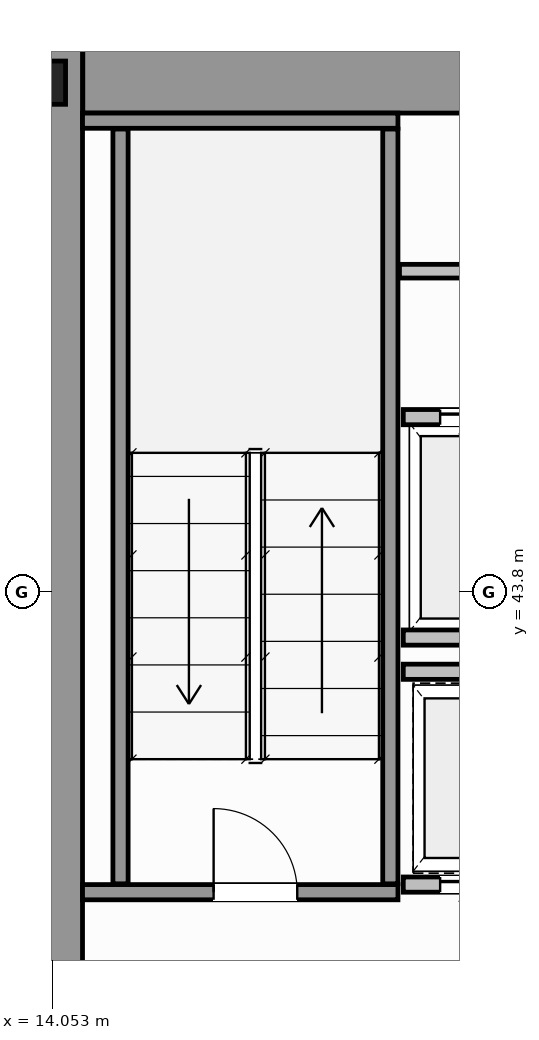
"""IFC4 building model, lengths in metres.
Left out: names, types, materials, properties, quantities, classifications, styles, units other than length and angle.
Written with IfcOpenShell. Run it as: python <this file> out.ifc"""

import sys

from ifc_helpers import new_model, si_unit, direction, frame, frame_2d, origin, origin_2d, place, context, subcontext, project, spatial, rectangle, i_section, extrude, source, transform, mapped, element, fill, save


model = new_model("IFC4")
c1 = context("Model", 3, precision=1e-05, world=origin(), true_north=direction((0.0, 1.0)))
c2 = subcontext(c1, "Body", "Model", "MODEL_VIEW")
j1 = project(units=[si_unit("LENGTHUNIT", "METRE"), si_unit("PLANEANGLEUNIT", "RADIAN")], contexts=[c1])
p1 = place(None, origin())
s1 = spatial("IfcSite", under=j1, at=p1, CompositionType="ELEMENT")
p2 = place(p1, origin())
s2 = spatial("IfcBuilding", under=s1, at=p2, CompositionType="ELEMENT")
p3 = place(p2, frame((0.0, 0.0, 5.6)))
s3 = spatial("IfcBuildingStorey", under=s2, at=p3, CompositionType="ELEMENT", Elevation=5.6)
m1 = source(origin(), c2, "Body", "SweptSolid", [
    extrude(i_section(OverallWidth=0.454, OverallDepth=0.569, WebThickness=0.078, FlangeThickness=0.08, FilletRadius=0.015, at=origin_2d()), origin(), (0.0, 0.0, 1.0), 4.4),
])
p4 = place(p3, frame((14.0, 50.5, 0.0), z_axis=(0.0, 0.0, 1.0), x_axis=(1.0, 0.0, 0.0)))
e1 = element("IfcColumn", 1, at=p4, inside=s3, PredefinedType="COLUMN", context=c2, shape_type="MappedRepresentation", body=[
    mapped(m1, transform((0.0, 0.0, 0.0), scale=1.0)),
])
p5 = place(p3, frame((14.454, 50.55, 0.0), z_axis=(0.0, 0.0, 1.0), x_axis=(1.0, 0.0, 0.0)))
e2 = element("IfcWall", 2, at=p5, inside=s3, PredefinedType="SHEAR", context=c2, shape_type="SweptSolid", body=[
    extrude(rectangle(XDim=19.544, YDim=0.9, at=frame_2d((9.772, 0.0))), origin(), (0.0, 0.0, 1.0), 4.4),
])
p6 = place(p3, frame((14.0, 36.5, 0.0), z_axis=(0.0, 0.0, 1.0), x_axis=(0.0, 1.0, 0.0)))
e3 = element("IfcWall", 3, at=p6, inside=s3, PredefinedType="SHEAR", context=c2, shape_type="SweptSolid", body=[
    extrude(rectangle(XDim=14.5, YDim=0.9, at=frame_2d((7.25, 0.0))), origin(), (0.0, 0.0, 1.0), 4.4),
])
p7 = place(p3, frame((14.45, 39.85, 0.0), z_axis=(0.0, 0.0, 1.0), x_axis=(1.0, 0.0, 0.0)))
e4 = element("IfcWall", 4, at=p7, inside=s3, PredefinedType="SOLIDWALL", context=c2, shape_type="SweptSolid", body=[
    extrude(rectangle(XDim=4.15, YDim=0.2, at=frame_2d((2.075, 0.0))), origin(), (0.0, 0.0, 1.0), 4.4),
])
p8 = place(p7, frame((1.725, 0.0, 0.0)))
e5 = element("IfcOpeningElement", 5, at=p8, cuts=e4, PredefinedType="OPENING", context=c2, shape_type="SweptSolid", body=[
    extrude(rectangle(XDim=1.1, YDim=2.15, at=frame_2d((0.55, 1.075))), frame((0.0, 0.11, 0.0), z_axis=(0.0, -1.0, 0.0), x_axis=(1.0, 0.0, 0.0)), (0.0, 0.0, 1.0), 0.22),
])
p9 = place(p3, frame((14.45, 50.0, 0.0), z_axis=(0.0, 0.0, 1.0), x_axis=(1.0, 0.0, 0.0)))
e6 = element("IfcWall", 6, at=p9, inside=s3, PredefinedType="SOLIDWALL", context=c2, shape_type="SweptSolid", body=[
    extrude(rectangle(XDim=4.15, YDim=0.2, at=frame_2d((2.075, 0.0))), origin(), (0.0, 0.0, 1.0), 4.4),
])
for number, where, z_axis, x_axis in (
    (7, (14.95, 39.96, 0.0), (0.0, 0.0, 1.0), (0.0, 1.0, 0.0)),
    (8, (18.5, 39.96, 0.0), (0.0, 0.0, 1.0), (0.0, 1.0, 0.0)),
):
    element("IfcWall", number, at=place(p3, frame(where, z_axis=z_axis, x_axis=x_axis)), inside=s3, PredefinedType="SOLIDWALL", context=c2, shape_type="SweptSolid", body=[
        extrude(rectangle(XDim=9.93, YDim=0.2, at=frame_2d((4.965, 0.0))), origin(), (0.0, 0.0, 1.0), 4.4),
    ])
p10 = place(p3, frame((18.67, 46.1, 0.0), z_axis=(0.0, 0.0, 1.0), x_axis=(1.0, 0.0, 0.0)))
e9 = element("IfcWall", 9, at=p10, inside=s3, PredefinedType="SOLIDWALL", context=c2, shape_type="SweptSolid", body=[
    extrude(rectangle(XDim=2.07, YDim=0.2, at=frame_2d((1.035, 0.0))), origin(), (0.0, 0.0, 1.0), 4.12),
])
p11 = place(p10, frame((0.485, 0.0, 0.0)))
e10 = element("IfcOpeningElement", 10, at=p11, cuts=e9, PredefinedType="OPENING", context=c2, shape_type="SweptSolid", body=[
    extrude(rectangle(XDim=1.1, YDim=2.15, at=frame_2d((0.55, 1.075))), frame((0.0, 0.11, 0.0), z_axis=(0.0, -1.0, 0.0), x_axis=(1.0, 0.0, 0.0)), (0.0, 0.0, 1.0), 0.22),
])
p12 = place(p3, frame((18.67, 43.2, 0.0), z_axis=(0.0, 0.0, 1.0), x_axis=(1.0, 0.0, 0.0)))
e11 = element("IfcWall", 11, at=p12, inside=s3, PredefinedType="SOLIDWALL", context=c2, shape_type="SweptSolid", body=[
    extrude(rectangle(XDim=2.07, YDim=0.2, at=frame_2d((1.035, 0.0))), origin(), (0.0, 0.0, 1.0), 4.12),
])
p13 = place(p3, frame((18.67, 39.95, 0.0), z_axis=(0.0, 0.0, 1.0), x_axis=(1.0, 0.0, 0.0)))
e12 = element("IfcWall", 12, at=p13, inside=s3, PredefinedType="SOLIDWALL", context=c2, shape_type="SweptSolid", body=[
    extrude(rectangle(XDim=2.07, YDim=0.2, at=frame_2d((1.035, 0.0))), origin(), (0.0, 0.0, 1.0), 4.12),
])
p14 = place(p13, frame((0.485, 0.0, 0.0)))
e13 = element("IfcOpeningElement", 13, at=p14, cuts=e12, PredefinedType="OPENING", context=c2, shape_type="SweptSolid", body=[
    extrude(rectangle(XDim=1.1, YDim=2.15, at=frame_2d((0.55, 1.075))), frame((0.0, 0.11, 0.0), z_axis=(0.0, -1.0, 0.0), x_axis=(1.0, 0.0, 0.0)), (0.0, 0.0, 1.0), 0.22),
])
p15 = place(p3, frame((18.67, 42.75, 0.0), z_axis=(0.0, 0.0, 1.0), x_axis=(1.0, 0.0, 0.0)))
e14 = element("IfcWall", 14, at=p15, inside=s3, PredefinedType="SOLIDWALL", context=c2, shape_type="SweptSolid", body=[
    extrude(rectangle(XDim=2.07, YDim=0.2, at=frame_2d((1.035, 0.0))), origin(), (0.0, 0.0, 1.0), 4.12),
])
p16 = place(p3, frame((18.62, 48.02, 0.0), z_axis=(0.0, 0.0, 1.0), x_axis=(1.0, 0.0, 0.0)))
e15 = element("IfcWall", 15, at=p16, inside=s3, PredefinedType="PLUMBINGWALL", context=c2, shape_type="SweptSolid", body=[
    extrude(rectangle(XDim=30.76, YDim=0.18, at=frame_2d((15.38, 0.0))), origin(), (0.0, 0.0, 1.0), 4.12),
])
p17 = place(p16, frame((1.955, 0.0, 0.0)))
e16 = element("IfcOpeningElement", 16, at=p17, cuts=e15, PredefinedType="OPENING", context=c2, shape_type="SweptSolid", body=[
    extrude(rectangle(XDim=0.9, YDim=2.15, at=frame_2d((0.45, 1.075))), frame((0.0, 0.1, 0.0), z_axis=(0.0, -1.0, 0.0), x_axis=(1.0, 0.0, 0.0)), (0.0, 0.0, 1.0), 0.2),
])
p18 = place(p16, frame((8.03, 0.0, 0.0)))
e17 = element("IfcOpeningElement", 17, at=p18, cuts=e15, PredefinedType="OPENING", context=c2, shape_type="SweptSolid", body=[
    extrude(rectangle(XDim=0.9, YDim=2.15, at=frame_2d((0.45, 1.075))), frame((0.0, 0.1, 0.0), z_axis=(0.0, -1.0, 0.0), x_axis=(1.0, 0.0, 0.0)), (0.0, 0.0, 1.0), 0.2),
])
p19 = place(p16, frame((16.93, 0.0, 0.0)))
e18 = element("IfcOpeningElement", 18, at=p19, cuts=e15, PredefinedType="OPENING", context=c2, shape_type="SweptSolid", body=[
    extrude(rectangle(XDim=0.9, YDim=2.15, at=frame_2d((0.45, 1.075))), frame((0.0, 0.1, 0.0), z_axis=(0.0, -1.0, 0.0), x_axis=(1.0, 0.0, 0.0)), (0.0, 0.0, 1.0), 0.2),
])
p20 = place(p16, frame((26.205, 0.0, 0.0)))
e19 = element("IfcOpeningElement", 19, at=p20, cuts=e15, PredefinedType="OPENING", context=c2, shape_type="SweptSolid", body=[
    extrude(rectangle(XDim=0.9, YDim=2.15, at=frame_2d((0.45, 1.075))), frame((0.0, 0.1, 0.0), z_axis=(0.0, -1.0, 0.0), x_axis=(1.0, 0.0, 0.0)), (0.0, 0.0, 1.0), 0.2),
])
m2 = source(origin(), c2, "Body", "SweptSolid", [
    extrude(rectangle(XDim=1.1, YDim=2.15, at=frame_2d((0.55, 1.075))), frame((0.0, 0.025, 0.0), z_axis=(0.0, -1.0, 0.0), x_axis=(1.0, 0.0, 0.0)), (0.0, 0.0, 1.0), 0.05),
])
p21 = place(p8, origin())
e20 = element("IfcDoor", 20, at=p21, inside=s3, OperationType="SINGLE_SWING_LEFT", PredefinedType="DOOR", context=c2, shape_type="MappedRepresentation", body=[
    mapped(m2, transform((0.0, 0.0, 0.0), scale=1.0)),
])
fill(e5, e20)
p22 = place(p11, origin())
e21 = element("IfcDoor", 21, at=p22, inside=s3, OperationType="DOUBLE_DOOR_SLIDING", PredefinedType="DOOR", context=c2, shape_type="MappedRepresentation", body=[
    mapped(m2, transform((0.0, 0.0, 0.0), scale=1.0)),
])
fill(e10, e21)
p23 = place(p14, origin())
e22 = element("IfcDoor", 22, at=p23, inside=s3, OperationType="DOUBLE_DOOR_SLIDING", PredefinedType="DOOR", context=c2, shape_type="MappedRepresentation", body=[
    mapped(m2, transform((0.0, 0.0, 0.0), scale=1.0)),
])
fill(e13, e22)
save(model, sys.argv[1])
